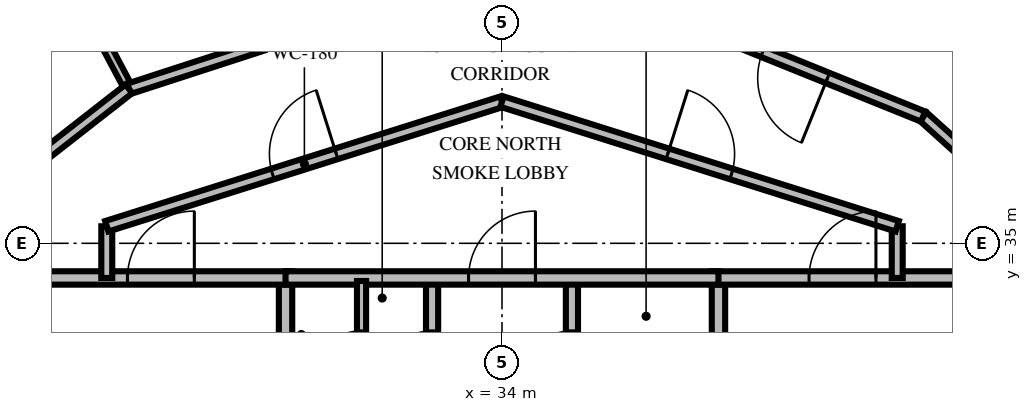
"""IFC4 building model, lengths in metres.
Left out: names, types, materials, properties, quantities, classifications, styles, units other than length and angle.
Written with IfcOpenShell. Run it as: python <this file> out.ifc"""

import sys

from ifc_helpers import new_model, si_unit, direction, frame, frame_2d, origin, place, context, subcontext, project, spatial, rectangle, extrude, element, fill, save


model = new_model("IFC4")
c1 = context("Model", 3, precision=1e-05, world=origin(), true_north=direction((0.0, 1.0)))
c2 = subcontext(c1, "Body", "Model", "MODEL_VIEW")
j1 = project(units=[si_unit("LENGTHUNIT", "METRE"), si_unit("PLANEANGLEUNIT", "RADIAN")], contexts=[c1])
p1 = place(None, origin())
s1 = spatial("IfcSite", under=j1, at=p1, CompositionType="ELEMENT")
p2 = place(p1, origin())
s2 = spatial("IfcBuilding", under=s1, at=p2, CompositionType="ELEMENT")
p3 = place(p2, frame((0.0, 0.0, 191.6)))
s3 = spatial("IfcBuildingStorey", under=s2, at=p3, CompositionType="ELEMENT", Elevation=191.6)
p4 = place(p3, frame((30.44, 30.05, 0.0), z_axis=(0.0, 0.0, 1.0), x_axis=(0.0, 1.0, 0.0)))
e1 = element("IfcWall", 1, at=p4, inside=s3, PredefinedType="SOLIDWALL", context=c2, shape_type="SweptSolid", body=[
    extrude(rectangle(XDim=4.38, YDim=0.22, at=frame_2d((2.19, 0.0))), origin(), (0.0, 0.0, 1.0), 2.46),
])
p5 = place(p4, frame((0.8, 0.0, 0.0)))
e2 = element("IfcOpeningElement", 2, at=p5, cuts=e1, PredefinedType="OPENING", context=c2, shape_type="SweptSolid", body=[
    extrude(rectangle(XDim=1.05, YDim=2.1, at=frame_2d((0.525, 1.05))), frame((0.0, 0.12, 0.0), z_axis=(0.0, -1.0, 0.0), x_axis=(1.0, 0.0, 0.0)), (0.0, 0.0, 1.0), 0.24),
])
p6 = place(p3, frame((26.24, 34.43, 0.0), z_axis=(0.0, 0.0, 1.0), x_axis=(1.0, 0.0, 0.0)))
e3 = element("IfcWall", 3, at=p6, inside=s3, PredefinedType="SOLIDWALL", context=c2, shape_type="SweptSolid", body=[
    extrude(rectangle(XDim=4.31, YDim=0.22, at=frame_2d((2.155, 0.0))), origin(), (0.0, 0.0, 1.0), 2.46),
])
p7 = place(p6, frame((1.6, 0.0, 0.0)))
e4 = element("IfcOpeningElement", 4, at=p7, cuts=e3, PredefinedType="OPENING", context=c2, shape_type="SweptSolid", body=[
    extrude(rectangle(XDim=1.1, YDim=2.15, at=frame_2d((0.55, 1.075))), frame((0.0, 0.12, 0.0), z_axis=(0.0, -1.0, 0.0), x_axis=(1.0, 0.0, 0.0)), (0.0, 0.0, 1.0), 0.24),
])
p8 = place(p3, frame((32.85, 30.05, 0.0), z_axis=(0.0, 0.0, 1.0), x_axis=(0.0, 1.0, 0.0)))
e5 = element("IfcWall", 5, at=p8, inside=s3, PredefinedType="SOLIDWALL", context=c2, shape_type="SweptSolid", body=[
    extrude(rectangle(XDim=4.38, YDim=0.2, at=frame_2d((2.19, 0.0))), origin(), (0.0, 0.0, 1.0), 2.46),
])
p9 = place(p8, frame((2.65, 0.0, 0.0)))
e6 = element("IfcOpeningElement", 6, at=p9, cuts=e5, PredefinedType="OPENING", context=c2, shape_type="SweptSolid", body=[
    extrude(rectangle(XDim=0.86, YDim=2.05, at=frame_2d((0.43, 1.025))), frame((0.0, 0.11, 0.0), z_axis=(0.0, -1.0, 0.0), x_axis=(1.0, 0.0, 0.0)), (0.0, 0.0, 1.0), 0.22),
])
p10 = place(p3, frame((37.56, 30.05, 0.0), z_axis=(0.0, 0.0, 1.0), x_axis=(0.0, 1.0, 0.0)))
e7 = element("IfcWall", 7, at=p10, inside=s3, PredefinedType="SOLIDWALL", context=c2, shape_type="SweptSolid", body=[
    extrude(rectangle(XDim=4.38, YDim=0.22, at=frame_2d((2.19, 0.0))), origin(), (0.0, 0.0, 1.0), 2.46),
])
p11 = place(p10, frame((0.8, 0.0, 0.0)))
e8 = element("IfcOpeningElement", 8, at=p11, cuts=e7, PredefinedType="OPENING", context=c2, shape_type="SweptSolid", body=[
    extrude(rectangle(XDim=1.05, YDim=2.1, at=frame_2d((0.525, 1.05))), frame((0.0, 0.12, 0.0), z_axis=(0.0, -1.0, 0.0), x_axis=(1.0, 0.0, 0.0)), (0.0, 0.0, 1.0), 0.24),
])
p12 = place(p3, frame((37.45, 34.43, 0.0), z_axis=(0.0, 0.0, 1.0), x_axis=(1.0, 0.0, 0.0)))
e9 = element("IfcWall", 9, at=p12, inside=s3, PredefinedType="SOLIDWALL", context=c2, shape_type="SweptSolid", body=[
    extrude(rectangle(XDim=4.31, YDim=0.22, at=frame_2d((2.155, 0.0))), origin(), (0.0, 0.0, 1.0), 2.46),
])
p13 = place(p12, frame((1.6, 0.0, 0.0)))
e10 = element("IfcOpeningElement", 10, at=p13, cuts=e9, PredefinedType="OPENING", context=c2, shape_type="SweptSolid", body=[
    extrude(rectangle(XDim=1.1, YDim=2.15, at=frame_2d((0.55, 1.075))), frame((0.0, 0.12, 0.0), z_axis=(0.0, -1.0, 0.0), x_axis=(1.0, 0.0, 0.0)), (0.0, 0.0, 1.0), 0.24),
])
p14 = place(p3, frame((35.15, 30.05, 0.0), z_axis=(0.0, 0.0, 1.0), x_axis=(0.0, 1.0, 0.0)))
e11 = element("IfcWall", 11, at=p14, inside=s3, PredefinedType="SOLIDWALL", context=c2, shape_type="SweptSolid", body=[
    extrude(rectangle(XDim=4.38, YDim=0.2, at=frame_2d((2.19, 0.0))), origin(), (0.0, 0.0, 1.0), 2.46),
])
p15 = place(p14, frame((2.65, 0.0, 0.0)))
e12 = element("IfcOpeningElement", 12, at=p15, cuts=e11, PredefinedType="OPENING", context=c2, shape_type="SweptSolid", body=[
    extrude(rectangle(XDim=0.86, YDim=2.05, at=frame_2d((0.43, 1.025))), frame((0.0, 0.11, 0.0), z_axis=(0.0, -1.0, 0.0), x_axis=(1.0, 0.0, 0.0)), (0.0, 0.0, 1.0), 0.22),
])
p16 = place(p3, frame((30.44, 34.43, 0.0), z_axis=(0.0, 0.0, 1.0), x_axis=(1.0, 0.0, 0.0)))
e13 = element("IfcWall", 13, at=p16, inside=s3, PredefinedType="SOLIDWALL", context=c2, shape_type="SweptSolid", body=[
    extrude(rectangle(XDim=7.12, YDim=0.22, at=frame_2d((3.56, 0.0))), origin(), (0.0, 0.0, 1.0), 2.46),
])
p17 = place(p16, frame((3.01, 0.0, 0.0)))
e14 = element("IfcOpeningElement", 14, at=p17, cuts=e13, PredefinedType="OPENING", context=c2, shape_type="SweptSolid", body=[
    extrude(rectangle(XDim=1.1, YDim=2.15, at=frame_2d((0.55, 1.075))), frame((0.0, 0.12, 0.0), z_axis=(0.0, -1.0, 0.0), x_axis=(1.0, 0.0, 0.0)), (0.0, 0.0, 1.0), 0.24),
])
p18 = place(p3, frame((31.69, 32.05, 0.0), z_axis=(0.0, 0.0, 1.0), x_axis=(0.0, 1.0, 0.0)))
e15 = element("IfcWall", 15, at=p18, inside=s3, PredefinedType="PARTITIONING", context=c2, shape_type="SweptSolid", body=[
    extrude(rectangle(XDim=2.33, YDim=0.15, at=frame_2d((1.165, 0.0))), origin(), (0.0, 0.0, 1.0), 2.46),
])
p19 = place(p18, frame((0.65, 0.0, 0.0)))
e16 = element("IfcOpeningElement", 16, at=p19, cuts=e15, PredefinedType="OPENING", context=c2, shape_type="SweptSolid", body=[
    extrude(rectangle(XDim=0.86, YDim=2.05, at=frame_2d((0.43, 1.025))), frame((0.0, 0.085, 0.0), z_axis=(0.0, -1.0, 0.0), x_axis=(1.0, 0.0, 0.0)), (0.0, 0.0, 1.0), 0.17),
])
for number, where, z_axis, x_axis in (
    (17, (27.5, 34.43, 0.0), (0.0, 0.0, 1.0), (0.0, 1.0, 0.0)),
    (18, (40.5, 35.28, 0.0), (0.0, 0.0, 1.0), (0.0, -1.0, 0.0)),
):
    element("IfcWall", number, at=place(p3, frame(where, z_axis=z_axis, x_axis=x_axis)), inside=s3, PredefinedType="PARTITIONING", context=c2, shape_type="SweptSolid", body=[
        extrude(rectangle(XDim=0.85, YDim=0.18, at=frame_2d((0.425, 0.0))), origin(), (0.0, 0.0, 1.0), 2.46),
    ])
p20 = place(p3, frame((27.5, 35.28, 0.0), z_axis=(0.0, 0.0, 1.0), x_axis=(0.953691418528, 0.300786765376, 0.0)))
e19 = element("IfcWall", 19, at=p20, inside=s3, PredefinedType="PARTITIONING", context=c2, shape_type="SweptSolid", body=[
    extrude(rectangle(XDim=6.816, YDim=0.18, at=frame_2d((3.408, 0.0))), origin(), (0.0, 0.0, 1.0), 2.46),
])
p21 = place(p20, frame((2.858, 0.0, 0.0)))
e20 = element("IfcOpeningElement", 20, at=p21, cuts=e19, PredefinedType="OPENING", context=c2, shape_type="SweptSolid", body=[
    extrude(rectangle(XDim=1.1, YDim=2.15, at=frame_2d((0.55, 1.075))), frame((0.0, 0.1, 0.0), z_axis=(0.0, -1.0, 0.0), x_axis=(1.0, 0.0, 0.0)), (0.0, 0.0, 1.0), 0.2),
])
p22 = place(p3, frame((34.0, 37.33, 0.0), z_axis=(0.0, 0.0, 1.0), x_axis=(0.953691418528, -0.300786765376, 0.0)))
e21 = element("IfcWall", 21, at=p22, inside=s3, PredefinedType="PARTITIONING", context=c2, shape_type="SweptSolid", body=[
    extrude(rectangle(XDim=6.816, YDim=0.18, at=frame_2d((3.408, 0.0))), origin(), (0.0, 0.0, 1.0), 2.46),
])
p23 = place(p22, frame((2.858, 0.0, 0.0)))
e22 = element("IfcOpeningElement", 22, at=p23, cuts=e21, PredefinedType="OPENING", context=c2, shape_type="SweptSolid", body=[
    extrude(rectangle(XDim=1.1, YDim=2.15, at=frame_2d((0.55, 1.075))), frame((0.0, 0.1, 0.0), z_axis=(0.0, -1.0, 0.0), x_axis=(1.0, 0.0, 0.0)), (0.0, 0.0, 1.0), 0.2),
])
p24 = place(p3, frame((27.864, 37.54, 0.0), z_axis=(0.0, 0.0, 1.0), x_axis=(-0.469457334857, 0.882955157836, 0.0)))
e23 = element("IfcWall", 23, at=p24, inside=s3, PredefinedType="PARTITIONING", context=c2, shape_type="SweptSolid", body=[
    extrude(rectangle(XDim=4.943, YDim=0.14, at=frame_2d((2.472, 0.0))), origin(), (0.0, 0.0, 1.0), 2.46),
])
p25 = place(p3, frame((44.299, 34.047, 0.0), z_axis=(0.0, 0.0, 1.0), x_axis=(-0.74314168775, 0.669134091141, 0.0)))
e24 = element("IfcWall", 24, at=p25, inside=s3, PredefinedType="PARTITIONING", context=c2, shape_type="SweptSolid", body=[
    extrude(rectangle(XDim=4.539, YDim=0.18, at=frame_2d((2.27, 0.0))), origin(), (0.0, 0.0, 1.0), 2.46),
])
p26 = place(p3, frame((40.926, 37.084, 0.0), z_axis=(0.0, 0.0, 1.0), x_axis=(-0.927184006015, 0.374606218568, 0.0)))
e25 = element("IfcWall", 25, at=p26, inside=s3, PredefinedType="PARTITIONING", context=c2, shape_type="SweptSolid", body=[
    extrude(rectangle(XDim=4.539, YDim=0.18, at=frame_2d((2.27, 0.0))), origin(), (0.0, 0.0, 1.0), 2.46),
])
p27 = place(p26, frame((1.695, 0.0, 0.0)))
e26 = element("IfcOpeningElement", 26, at=p27, cuts=e25, PredefinedType="OPENING", context=c2, shape_type="SweptSolid", body=[
    extrude(rectangle(XDim=1.15, YDim=2.15, at=frame_2d((0.575, 1.075))), frame((0.0, 0.1, 0.0), z_axis=(0.0, -1.0, 0.0), x_axis=(1.0, 0.0, 0.0)), (0.0, 0.0, 1.0), 0.2),
])
p28 = place(p3, frame((32.181, 38.943, 0.0), z_axis=(0.0, 0.0, 1.0), x_axis=(-0.951044345013, -0.309054451219, 0.0)))
e27 = element("IfcWall", 27, at=p28, inside=s3, PredefinedType="PARTITIONING", context=c2, shape_type="SweptSolid", body=[
    extrude(rectangle(XDim=4.539, YDim=0.18, at=frame_2d((2.27, 0.0))), origin(), (0.0, 0.0, 1.0), 2.46),
])
p29 = place(p3, frame((27.864, 37.54, 0.0), z_axis=(0.0, 0.0, 1.0), x_axis=(-0.788026820044, -0.61564091067, 0.0)))
e28 = element("IfcWall", 28, at=p29, inside=s3, PredefinedType="PARTITIONING", context=c2, shape_type="SweptSolid", body=[
    extrude(rectangle(XDim=4.539, YDim=0.18, at=frame_2d((2.27, 0.0))), origin(), (0.0, 0.0, 1.0), 2.46),
])
p30 = place(p29, frame((2.579, 0.0, 0.0)))
e29 = element("IfcOpeningElement", 29, at=p30, cuts=e28, PredefinedType="OPENING", context=c2, shape_type="SweptSolid", body=[
    extrude(rectangle(XDim=1.0, YDim=2.15, at=frame_2d((0.5, 1.075))), frame((0.0, 0.1, 0.0), z_axis=(0.0, -1.0, 0.0), x_axis=(1.0, 0.0, 0.0)), (0.0, 0.0, 1.0), 0.2),
])
p31 = place(p3, frame((26.831, 39.483, 0.0), z_axis=(0.0, 0.0, 1.0), x_axis=(-0.788011811191, -0.615660121677, 0.0)))
e30 = element("IfcWall", 30, at=p31, inside=s3, PredefinedType="PARTITIONING", context=c2, shape_type="SweptSolid", body=[
    extrude(rectangle(XDim=5.303, YDim=0.14, at=frame_2d((2.652, 0.0))), origin(), (0.0, 0.0, 1.0), 2.46),
])
p32 = place(p31, frame((3.175, 0.0, 0.0)))
e31 = element("IfcOpeningElement", 31, at=p32, cuts=e30, PredefinedType="OPENING", context=c2, shape_type="SweptSolid", body=[
    extrude(rectangle(XDim=0.95, YDim=2.15, at=frame_2d((0.475, 1.075))), frame((0.0, 0.08, 0.0), z_axis=(0.0, -1.0, 0.0), x_axis=(1.0, 0.0, 0.0)), (0.0, 0.0, 1.0), 0.16),
])
p33 = place(p7, origin())
e32 = element("IfcDoor", 32, at=p33, inside=s3, OperationType="SINGLE_SWING_RIGHT", PredefinedType="DOOR", context=c2, shape_type="SweptSolid", body=[
    extrude(rectangle(XDim=1.1, YDim=2.15, at=frame_2d((0.55, 1.075))), frame((0.0, 0.025, 0.0), z_axis=(0.0, -1.0, 0.0), x_axis=(1.0, 0.0, 0.0)), (0.0, 0.0, 1.0), 0.05),
])
fill(e4, e32)
p34 = place(p9, origin())
e33 = element("IfcDoor", 33, at=p34, inside=s3, OperationType="SINGLE_SWING_LEFT", PredefinedType="TRAPDOOR", context=c2, shape_type="SweptSolid", body=[
    extrude(rectangle(XDim=0.86, YDim=2.05, at=frame_2d((0.43, 1.025))), frame((0.0, 0.025, 0.0), z_axis=(0.0, -1.0, 0.0), x_axis=(1.0, 0.0, 0.0)), (0.0, 0.0, 1.0), 0.05),
])
fill(e6, e33)
p35 = place(p13, origin())
e34 = element("IfcDoor", 34, at=p35, inside=s3, OperationType="SINGLE_SWING_RIGHT", PredefinedType="DOOR", context=c2, shape_type="SweptSolid", body=[
    extrude(rectangle(XDim=1.1, YDim=2.15, at=frame_2d((0.55, 1.075))), frame((0.0, 0.025, 0.0), z_axis=(0.0, -1.0, 0.0), x_axis=(1.0, 0.0, 0.0)), (0.0, 0.0, 1.0), 0.05),
])
fill(e10, e34)
p36 = place(p15, origin())
e35 = element("IfcDoor", 35, at=p36, inside=s3, OperationType="SINGLE_SWING_LEFT", PredefinedType="TRAPDOOR", context=c2, shape_type="SweptSolid", body=[
    extrude(rectangle(XDim=0.86, YDim=2.05, at=frame_2d((0.43, 1.025))), frame((0.0, 0.025, 0.0), z_axis=(0.0, -1.0, 0.0), x_axis=(1.0, 0.0, 0.0)), (0.0, 0.0, 1.0), 0.05),
])
fill(e12, e35)
p37 = place(p17, origin())
e36 = element("IfcDoor", 36, at=p37, inside=s3, OperationType="SINGLE_SWING_RIGHT", PredefinedType="DOOR", context=c2, shape_type="SweptSolid", body=[
    extrude(rectangle(XDim=1.1, YDim=2.15, at=frame_2d((0.55, 1.075))), frame((0.0, 0.025, 0.0), z_axis=(0.0, -1.0, 0.0), x_axis=(1.0, 0.0, 0.0)), (0.0, 0.0, 1.0), 0.05),
])
fill(e14, e36)
p38 = place(p19, origin())
e37 = element("IfcDoor", 37, at=p38, inside=s3, OperationType="SINGLE_SWING_LEFT", PredefinedType="TRAPDOOR", context=c2, shape_type="SweptSolid", body=[
    extrude(rectangle(XDim=0.86, YDim=2.05, at=frame_2d((0.43, 1.025))), frame((0.0, 0.025, 0.0), z_axis=(0.0, -1.0, 0.0), x_axis=(1.0, 0.0, 0.0)), (0.0, 0.0, 1.0), 0.05),
])
fill(e16, e37)
p39 = place(p21, origin())
e38 = element("IfcDoor", 38, at=p39, inside=s3, OperationType="SINGLE_SWING_RIGHT", PredefinedType="DOOR", context=c2, shape_type="SweptSolid", body=[
    extrude(rectangle(XDim=1.1, YDim=2.15, at=frame_2d((0.55, 1.075))), frame((0.0, 0.025, 0.0), z_axis=(0.0, -1.0, 0.0), x_axis=(1.0, 0.0, 0.0)), (0.0, 0.0, 1.0), 0.05),
])
fill(e20, e38)
p40 = place(p23, origin())
e39 = element("IfcDoor", 39, at=p40, inside=s3, OperationType="SINGLE_SWING_LEFT", PredefinedType="DOOR", context=c2, shape_type="SweptSolid", body=[
    extrude(rectangle(XDim=1.1, YDim=2.15, at=frame_2d((0.55, 1.075))), frame((0.0, 0.025, 0.0), z_axis=(0.0, -1.0, 0.0), x_axis=(1.0, 0.0, 0.0)), (0.0, 0.0, 1.0), 0.05),
])
fill(e22, e39)
p41 = place(p27, origin())
e40 = element("IfcDoor", 40, at=p41, inside=s3, OperationType="SINGLE_SWING_LEFT", PredefinedType="DOOR", context=c2, shape_type="SweptSolid", body=[
    extrude(rectangle(XDim=1.15, YDim=2.15, at=frame_2d((0.575, 1.075))), frame((0.0, 0.025, 0.0), z_axis=(0.0, -1.0, 0.0), x_axis=(1.0, 0.0, 0.0)), (0.0, 0.0, 1.0), 0.05),
])
fill(e26, e40)
save(model, sys.argv[1])
